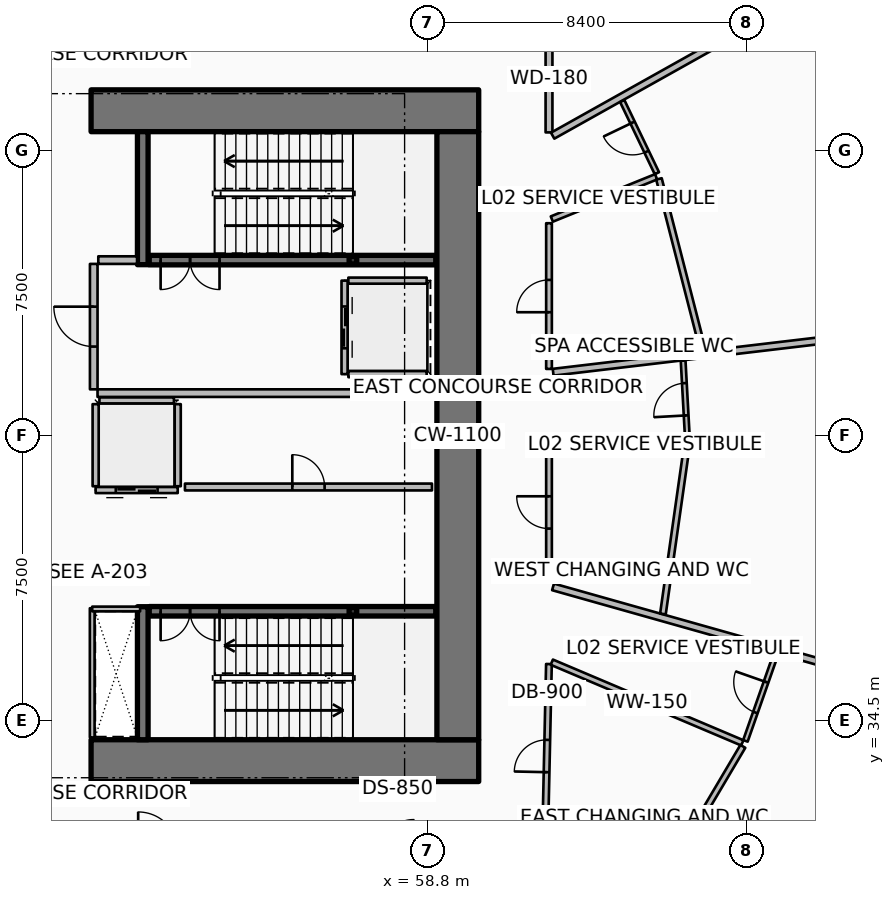
"""IFC4 building model, lengths in metres.
Left out: names, types, materials, properties, quantities, classifications, styles, units other than length and angle.
Written with IfcOpenShell. Run it as: python <this file> out.ifc"""

import sys

from ifc_helpers import new_model, si_unit, direction, frame, frame_2d, origin, origin_2d, place, context, subcontext, project, spatial, rectangle, hollow_rectangle, extrude, element, fill, save


model = new_model("IFC4")
c1 = context("Model", 3, precision=1e-05, world=origin(), true_north=direction((0.0, 1.0)))
c2 = subcontext(c1, "Body", "Model", "MODEL_VIEW")
j1 = project(units=[si_unit("LENGTHUNIT", "METRE"), si_unit("PLANEANGLEUNIT", "RADIAN")], contexts=[c1])
p1 = place(None, origin())
s1 = spatial("IfcSite", under=j1, at=p1, CompositionType="ELEMENT")
p2 = place(p1, origin())
s2 = spatial("IfcBuilding", under=s1, at=p2, CompositionType="ELEMENT")
p3 = place(p2, frame((0.0, 0.0, 12.0)))
s3 = spatial("IfcBuildingStorey", under=s2, at=p3, CompositionType="ELEMENT", Elevation=12.0)
for number, where, z_axis, x_axis in (
    (1, (49.95, 33.45, 0.0), (0.0, 0.0, 1.0), (1.0, 0.0, 0.0)),
    (2, (49.95, 50.55, 0.0), (0.0, 0.0, 1.0), (1.0, 0.0, 0.0)),
):
    element("IfcWall", number, at=place(p3, frame(where, z_axis=z_axis, x_axis=x_axis)), inside=s3, PredefinedType="SHEAR", context=c2, shape_type="SweptSolid", body=[
        extrude(rectangle(XDim=10.2, YDim=1.1, at=frame_2d((5.1, 0.0))), origin(), (0.0, 0.0, 1.0), 4.8),
    ])
p4 = place(p3, frame((59.6, 34.0, 0.0), z_axis=(0.0, 0.0, 1.0), x_axis=(0.0, 1.0, 0.0)))
e3 = element("IfcWall", 3, at=p4, inside=s3, PredefinedType="SHEAR", context=c2, shape_type="SweptSolid", body=[
    extrude(rectangle(XDim=16.0, YDim=1.1, at=frame_2d((8.0, 0.0))), origin(), (0.0, 0.0, 1.0), 4.8),
])
for number, where, z_axis, x_axis in (
    (4, (51.31, 46.5, 0.0), (0.0, 0.0, 1.0), (0.0, 1.0, 0.0)),
    (5, (51.31, 34.0, 0.0), (0.0, 0.0, 1.0), (0.0, 1.0, 0.0)),
):
    element("IfcWall", number, at=place(p3, frame(where, z_axis=z_axis, x_axis=x_axis)), inside=s3, PredefinedType="SHEAR", context=c2, shape_type="SweptSolid", body=[
        extrude(rectangle(XDim=3.5, YDim=0.28, at=frame_2d((1.75, 0.0))), origin(), (0.0, 0.0, 1.0), 4.8),
    ])
for number, where, z_axis, x_axis in (
    (6, (56.84, 46.62, 0.0), (0.0, 0.0, 1.0), (1.0, 0.0, 0.0)),
    (7, (56.84, 37.38, 0.0), (0.0, 0.0, 1.0), (1.0, 0.0, 0.0)),
):
    element("IfcColumn", number, at=place(p3, frame(where, z_axis=z_axis, x_axis=x_axis)), inside=s3, PredefinedType="COLUMN", context=c2, shape_type="SweptSolid", body=[
        extrude(hollow_rectangle(XDim=0.2, YDim=0.2, WallThickness=0.01, InnerFilletRadius=0.01, OuterFilletRadius=0.02, at=origin_2d()), origin(), (0.0, 0.0, 1.0), 2.195),
    ])
p5 = place(p3, frame((51.48, 46.62, 0.0), z_axis=(0.0, 0.0, 1.0), x_axis=(1.0, 0.0, 0.0)))
e8 = element("IfcWall", 8, at=p5, inside=s3, PredefinedType="SOLIDWALL", context=c2, shape_type="SweptSolid", body=[
    extrude(rectangle(XDim=7.54, YDim=0.25, at=frame_2d((3.77, 0.0))), origin(), (0.0, 0.0, 1.0), 4.48),
])
p6 = place(p5, frame((0.3, 0.0, 0.0)))
e9 = element("IfcOpeningElement", 9, at=p6, cuts=e8, PredefinedType="OPENING", context=c2, shape_type="SweptSolid", body=[
    extrude(rectangle(XDim=1.55, YDim=2.15, at=frame_2d((0.775, 1.075))), frame((0.0, 0.135, 0.0), z_axis=(0.0, -1.0, 0.0), x_axis=(1.0, 0.0, 0.0)), (0.0, 0.0, 1.0), 0.27),
])
p7 = place(p3, frame((51.48, 37.38, 0.0), z_axis=(0.0, 0.0, 1.0), x_axis=(1.0, 0.0, 0.0)))
e10 = element("IfcWall", 10, at=p7, inside=s3, PredefinedType="SOLIDWALL", context=c2, shape_type="SweptSolid", body=[
    extrude(rectangle(XDim=7.54, YDim=0.25, at=frame_2d((3.77, 0.0))), origin(), (0.0, 0.0, 1.0), 4.48),
])
p8 = place(p7, frame((0.3, 0.0, 0.0)))
e11 = element("IfcOpeningElement", 11, at=p8, cuts=e10, PredefinedType="OPENING", context=c2, shape_type="SweptSolid", body=[
    extrude(rectangle(XDim=1.55, YDim=2.15, at=frame_2d((0.775, 1.075))), frame((0.0, 0.135, 0.0), z_axis=(0.0, -1.0, 0.0), x_axis=(1.0, 0.0, 0.0)), (0.0, 0.0, 1.0), 0.27),
])
p9 = place(p3, frame((56.62, 46.08, 0.0), z_axis=(0.0, 0.0, 1.0), x_axis=(0.0, -1.0, 0.0)))
e12 = element("IfcWall", 12, at=p9, inside=s3, PredefinedType="PARTITIONING", context=c2, shape_type="SweptSolid", body=[
    extrude(rectangle(XDim=2.46, YDim=0.16, at=frame_2d((1.23, 0.0))), origin(), (0.0, 0.0, 1.0), 4.48),
])
p10 = place(p9, frame((0.68, 0.0, 0.0)))
e13 = element("IfcOpeningElement", 13, at=p10, cuts=e12, PredefinedType="OPENING", context=c2, shape_type="SweptSolid", body=[
    extrude(rectangle(XDim=1.1, YDim=2.1, at=frame_2d((0.55, 1.05))), frame((0.0, 0.09, 0.0), z_axis=(0.0, -1.0, 0.0), x_axis=(1.0, 0.0, 0.0)), (0.0, 0.0, 1.0), 0.18),
])
for number, where, z_axis, x_axis in (
    (14, (56.72, 46.08, 0.0), (0.0, 0.0, 1.0), (1.0, 0.0, 0.0)),
    (15, (56.72, 43.62, 0.0), (0.0, 0.0, 1.0), (1.0, 0.0, 0.0)),
):
    element("IfcWall", number, at=place(p3, frame(where, z_axis=z_axis, x_axis=x_axis)), inside=s3, PredefinedType="PARTITIONING", context=c2, shape_type="SweptSolid", body=[
        extrude(rectangle(XDim=2.06, YDim=0.16, at=frame_2d((1.03, 0.0))), origin(), (0.0, 0.0, 1.0), 4.48),
    ])
p11 = place(p3, frame((52.23, 40.57, 0.0), z_axis=(0.0, 0.0, 1.0), x_axis=(-1.0, 0.0, 0.0)))
e16 = element("IfcWall", 16, at=p11, inside=s3, PredefinedType="PARTITIONING", context=c2, shape_type="SweptSolid", body=[
    extrude(rectangle(XDim=2.16, YDim=0.16, at=frame_2d((1.08, 0.0))), origin(), (0.0, 0.0, 1.0), 4.48),
])
p12 = place(p11, frame((0.53, 0.0, 0.0)))
e17 = element("IfcOpeningElement", 17, at=p12, cuts=e16, PredefinedType="OPENING", context=c2, shape_type="SweptSolid", body=[
    extrude(rectangle(XDim=1.1, YDim=2.1, at=frame_2d((0.55, 1.05))), frame((0.0, 0.09, 0.0), z_axis=(0.0, -1.0, 0.0), x_axis=(1.0, 0.0, 0.0)), (0.0, 0.0, 1.0), 0.18),
])
for number, where, z_axis, x_axis in (
    (18, (52.23, 40.67, 0.0), (0.0, 0.0, 1.0), (0.0, 1.0, 0.0)),
    (19, (50.07, 40.67, 0.0), (0.0, 0.0, 1.0), (0.0, 1.0, 0.0)),
):
    element("IfcWall", number, at=place(p3, frame(where, z_axis=z_axis, x_axis=x_axis)), inside=s3, PredefinedType="PARTITIONING", context=c2, shape_type="SweptSolid", body=[
        extrude(rectangle(XDim=2.16, YDim=0.16, at=frame_2d((1.08, 0.0))), origin(), (0.0, 0.0, 1.0), 4.48),
    ])
p13 = place(p3, frame((50.17, 42.93, 0.0), z_axis=(0.0, 0.0, 1.0), x_axis=(1.0, 0.0, 0.0)))
e20 = element("IfcWall", 20, at=p13, inside=s3, PredefinedType="PARTITIONING", context=c2, shape_type="SweptSolid", body=[
    extrude(rectangle(XDim=1.96, YDim=0.16, at=frame_2d((0.98, 0.0))), origin(), (0.0, 0.0, 1.0), 4.48),
])
p14 = place(p3, frame((52.42, 40.65, 0.0), z_axis=(0.0, 0.0, 1.0), x_axis=(1.0, 0.0, 0.0)))
e21 = element("IfcWall", 21, at=p14, inside=s3, PredefinedType="PARTITIONING", context=c2, shape_type="SweptSolid", body=[
    extrude(rectangle(XDim=6.5, YDim=0.18, at=frame_2d((3.25, 0.0))), origin(), (0.0, 0.0, 1.0), 4.48),
])
p15 = place(p14, frame((2.825, 0.0, 0.0)))
e22 = element("IfcOpeningElement", 22, at=p15, cuts=e21, PredefinedType="OPENING", context=c2, shape_type="SweptSolid", body=[
    extrude(rectangle(XDim=0.85, YDim=2.06, at=frame_2d((0.425, 1.03))), frame((0.0, 0.1, 0.0), z_axis=(0.0, -1.0, 0.0), x_axis=(1.0, 0.0, 0.0)), (0.0, 0.0, 1.0), 0.2),
])
p16 = place(p3, frame((50.12, 43.12, 0.0), z_axis=(0.0, 0.0, 1.0), x_axis=(1.0, 0.0, 0.0)))
e23 = element("IfcWall", 23, at=p16, inside=s3, PredefinedType="PARTITIONING", context=c2, shape_type="SweptSolid", body=[
    extrude(rectangle(XDim=8.88, YDim=0.2, at=frame_2d((4.44, 0.0))), origin(), (0.0, 0.0, 1.0), 4.48),
])
p17 = place(p3, frame((50.14, 46.62, 0.0), z_axis=(0.0, 0.0, 1.0), x_axis=(1.0, 0.0, 0.0)))
e24 = element("IfcWall", 24, at=p17, inside=s3, PredefinedType="PARTITIONING", context=c2, shape_type="SweptSolid", body=[
    extrude(rectangle(XDim=1.02, YDim=0.2, at=frame_2d((0.51, 0.0))), origin(), (0.0, 0.0, 1.0), 4.48),
])
p18 = place(p3, frame((50.02, 43.22, 0.0), z_axis=(0.0, 0.0, 1.0), x_axis=(0.0, 1.0, 0.0)))
e25 = element("IfcWall", 25, at=p18, inside=s3, PredefinedType="PARTITIONING", context=c2, shape_type="SweptSolid", body=[
    extrude(rectangle(XDim=3.3, YDim=0.2, at=frame_2d((1.65, 0.0))), origin(), (0.0, 0.0, 1.0), 4.48),
])
p19 = place(p18, frame((1.125, 0.0, 0.0)))
e26 = element("IfcOpeningElement", 26, at=p19, cuts=e25, PredefinedType="OPENING", context=c2, shape_type="SweptSolid", body=[
    extrude(rectangle(XDim=1.05, YDim=2.1, at=frame_2d((0.525, 1.05))), frame((0.0, 0.11, 0.0), z_axis=(0.0, -1.0, 0.0), x_axis=(1.0, 0.0, 0.0)), (0.0, 0.0, 1.0), 0.22),
])
p20 = place(p3, frame((49.98, 34.06, 0.0), z_axis=(0.0, 0.0, 1.0), x_axis=(0.0, 1.0, 0.0)))
e27 = element("IfcWall", 27, at=p20, inside=s3, PredefinedType="PARTITIONING", context=c2, shape_type="SweptSolid", body=[
    extrude(rectangle(XDim=3.4, YDim=0.125, at=frame_2d((1.7, 0.0))), origin(), (0.0, 0.0, 1.0), 3.92),
])
p21 = place(p3, frame((49.98, 37.44, 0.0), z_axis=(0.0, 0.0, 1.0), x_axis=(1.0, 0.0, 0.0)))
e28 = element("IfcWall", 28, at=p21, inside=s3, PredefinedType="PARTITIONING", context=c2, shape_type="SweptSolid", body=[
    extrude(rectangle(XDim=1.26, YDim=0.125, at=frame_2d((0.63, 0.0))), origin(), (0.0, 0.0, 1.0), 3.92),
])
p22 = place(p3, frame((62.0, 49.98, 0.0), z_axis=(0.0, 0.0, 1.0), x_axis=(0.0, 1.0, 0.0)))
e29 = element("IfcWall", 29, at=p22, inside=s3, PredefinedType="PARTITIONING", context=c2, shape_type="SweptSolid", body=[
    extrude(rectangle(XDim=2.83, YDim=0.18, at=frame_2d((1.415, 0.0))), origin(), (0.0, 0.0, 1.0), 3.693),
])
p23 = place(p3, frame((62.096, 49.894, 0.0), z_axis=(0.0, 0.0, 1.0), x_axis=(0.872490608205, 0.488630881744, 0.0)))
e30 = element("IfcWall", 30, at=p23, inside=s3, PredefinedType="PARTITIONING", context=c2, shape_type="SweptSolid", body=[
    extrude(rectangle(XDim=19.185, YDim=0.18, at=frame_2d((9.592, 0.0))), origin(), (0.0, 0.0, 1.0), 3.693),
])
p24 = place(p3, frame((61.892, 31.15, 0.0), z_axis=(0.0, 0.0, 1.0), x_axis=(0.021928973177, 0.999759531155, 0.0)))
e31 = element("IfcWall", 31, at=p24, inside=s3, PredefinedType="PARTITIONING", context=c2, shape_type="SweptSolid", body=[
    extrude(rectangle(XDim=4.843, YDim=0.15, at=frame_2d((2.421, 0.0))), origin(), (0.0, 0.0, 1.0), 3.693),
])
p25 = place(p24, frame((1.997, 0.0, 0.0)))
e32 = element("IfcOpeningElement", 32, at=p25, cuts=e31, PredefinedType="OPENING", context=c2, shape_type="SweptSolid", body=[
    extrude(rectangle(XDim=0.85, YDim=2.06, at=frame_2d((0.425, 1.03))), frame((0.0, 0.085, 0.0), z_axis=(0.0, -1.0, 0.0), x_axis=(1.0, 0.0, 0.0)), (0.0, 0.0, 1.0), 0.17),
])
p26 = place(p3, frame((62.074, 36.041, 0.0), z_axis=(0.0, 0.0, 1.0), x_axis=(0.920841540816, -0.38993699069, 0.0)))
e33 = element("IfcWall", 33, at=p26, inside=s3, PredefinedType="PARTITIONING", context=c2, shape_type="SweptSolid", body=[
    extrude(rectangle(XDim=5.443, YDim=0.15, at=frame_2d((2.722, 0.0))), origin(), (0.0, 0.0, 1.0), 3.92),
])
p27 = place(p3, frame((64.375, 29.217, 0.0), z_axis=(0.0, 0.0, 1.0), x_axis=(0.509047270842, 0.860738564286, 0.0)))
e34 = element("IfcWall", 34, at=p27, inside=s3, PredefinedType="PARTITIONING", context=c2, shape_type="SweptSolid", body=[
    extrude(rectangle(XDim=5.354, YDim=0.15, at=frame_2d((2.677, 0.0))), origin(), (0.0, 0.0, 1.0), 3.693),
])
p28 = place(p3, frame((67.168, 33.97, 0.0), z_axis=(0.0, 0.0, 1.0), x_axis=(0.331316814656, 0.943519564358, 0.0)))
e35 = element("IfcWall", 35, at=p28, inside=s3, PredefinedType="PARTITIONING", context=c2, shape_type="SweptSolid", body=[
    extrude(rectangle(XDim=2.43, YDim=0.125, at=frame_2d((1.215, 0.0))), origin(), (0.0, 0.0, 1.0), 3.693),
])
p29 = place(p28, frame((0.79, 0.0, 0.0)))
e36 = element("IfcOpeningElement", 36, at=p29, cuts=e35, PredefinedType="OPENING", context=c2, shape_type="SweptSolid", body=[
    extrude(rectangle(XDim=0.85, YDim=2.06, at=frame_2d((0.425, 1.03))), frame((0.0, 0.073, 0.0), z_axis=(0.0, -1.0, 0.0), x_axis=(1.0, 0.0, 0.0)), (0.0, 0.0, 1.0), 0.145),
])
p30 = place(p3, frame((62.106, 38.022, 0.0), z_axis=(0.0, 0.0, 1.0), x_axis=(0.962455233657, -0.271440459782, 0.0)))
e37 = element("IfcWall", 37, at=p30, inside=s3, PredefinedType="PARTITIONING", context=c2, shape_type="SweptSolid", body=[
    extrude(rectangle(XDim=19.716, YDim=0.18, at=frame_2d((9.858, 0.0))), origin(), (0.0, 0.0, 1.0), 3.693),
])
p31 = place(p3, frame((62.0, 38.152, 0.0), z_axis=(0.0, 0.0, 1.0), x_axis=(0.0, 1.0, 0.0)))
e38 = element("IfcWall", 38, at=p31, inside=s3, PredefinedType="PARTITIONING", context=c2, shape_type="SweptSolid", body=[
    extrude(rectangle(XDim=3.658, YDim=0.15, at=frame_2d((1.829, 0.0))), origin(), (0.0, 0.0, 1.0), 3.693),
])
p32 = place(p31, frame((1.404, 0.0, 0.0)))
e39 = element("IfcOpeningElement", 39, at=p32, cuts=e38, PredefinedType="OPENING", context=c2, shape_type="SweptSolid", body=[
    extrude(rectangle(XDim=0.85, YDim=2.06, at=frame_2d((0.425, 1.03))), frame((0.0, 0.085, 0.0), z_axis=(0.0, -1.0, 0.0), x_axis=(1.0, 0.0, 0.0)), (0.0, 0.0, 1.0), 0.17),
])
p33 = place(p3, frame((62.08, 41.889, 0.0), z_axis=(0.0, 0.0, 1.0), x_axis=(0.999969031596, -0.007869933178, 0.0)))
e40 = element("IfcWall", 40, at=p33, inside=s3, PredefinedType="PARTITIONING", context=c2, shape_type="SweptSolid", body=[
    extrude(rectangle(XDim=3.505, YDim=0.15, at=frame_2d((1.753, 0.0))), origin(), (0.0, 0.0, 1.0), 3.92),
])
p34 = place(p3, frame((64.998, 37.309, 0.0), z_axis=(0.0, 0.0, 1.0), x_axis=(0.140922059176, 0.990020693338, 0.0)))
e41 = element("IfcWall", 41, at=p34, inside=s3, PredefinedType="PARTITIONING", context=c2, shape_type="SweptSolid", body=[
    extrude(rectangle(XDim=4.518, YDim=0.15, at=frame_2d((2.259, 0.0))), origin(), (0.0, 0.0, 1.0), 3.693),
])
p35 = place(p3, frame((65.641, 41.941, 0.0), z_axis=(0.0, 0.0, 1.0), x_axis=(-0.054918793983, 0.998490824228, 0.0)))
e42 = element("IfcWall", 42, at=p35, inside=s3, PredefinedType="PARTITIONING", context=c2, shape_type="SweptSolid", body=[
    extrude(rectangle(XDim=2.036, YDim=0.125, at=frame_2d((1.018, 0.0))), origin(), (0.0, 0.0, 1.0), 3.693),
])
p36 = place(p35, frame((0.593, 0.0, 0.0)))
e43 = element("IfcOpeningElement", 43, at=p36, cuts=e42, PredefinedType="OPENING", context=c2, shape_type="SweptSolid", body=[
    extrude(rectangle(XDim=0.85, YDim=2.06, at=frame_2d((0.425, 1.03))), frame((0.0, 0.073, 0.0), z_axis=(0.0, -1.0, 0.0), x_axis=(1.0, 0.0, 0.0)), (0.0, 0.0, 1.0), 0.145),
])
p37 = place(p3, frame((62.109, 43.67, 0.0), z_axis=(0.0, 0.0, 1.0), x_axis=(0.993068665713, 0.117535633659, 0.0)))
e44 = element("IfcWall", 44, at=p37, inside=s3, PredefinedType="PARTITIONING", context=c2, shape_type="SweptSolid", body=[
    extrude(rectangle(XDim=21.133, YDim=0.18, at=frame_2d((10.566, 0.0))), origin(), (0.0, 0.0, 1.0), 3.693),
])
p38 = place(p3, frame((62.0, 43.757, 0.0), z_axis=(0.0, 0.0, 1.0), x_axis=(0.0, 1.0, 0.0)))
e45 = element("IfcWall", 45, at=p38, inside=s3, PredefinedType="PARTITIONING", context=c2, shape_type="SweptSolid", body=[
    extrude(rectangle(XDim=3.833, YDim=0.15, at=frame_2d((1.917, 0.0))), origin(), (0.0, 0.0, 1.0), 3.693),
])
p39 = place(p38, frame((1.492, 0.0, 0.0)))
e46 = element("IfcOpeningElement", 46, at=p39, cuts=e45, PredefinedType="OPENING", context=c2, shape_type="SweptSolid", body=[
    extrude(rectangle(XDim=0.85, YDim=2.06, at=frame_2d((0.425, 1.03))), frame((0.0, 0.085, 0.0), z_axis=(0.0, -1.0, 0.0), x_axis=(1.0, 0.0, 0.0)), (0.0, 0.0, 1.0), 0.17),
])
p40 = place(p3, frame((62.074, 47.701, 0.0), z_axis=(0.0, 0.0, 1.0), x_axis=(0.926852538468, 0.375425587747, 0.0)))
e47 = element("IfcWall", 47, at=p40, inside=s3, PredefinedType="PARTITIONING", context=c2, shape_type="SweptSolid", body=[
    extrude(rectangle(XDim=2.96, YDim=0.15, at=frame_2d((1.48, 0.0))), origin(), (0.0, 0.0, 1.0), 3.92),
])
p41 = place(p3, frame((66.054, 44.237, 0.0), z_axis=(0.0, 0.0, 1.0), x_axis=(-0.248710144761, 0.968577959636, 0.0)))
e48 = element("IfcWall", 48, at=p41, inside=s3, PredefinedType="PARTITIONING", context=c2, shape_type="SweptSolid", body=[
    extrude(rectangle(XDim=4.667, YDim=0.15, at=frame_2d((2.333, 0.0))), origin(), (0.0, 0.0, 1.0), 3.693),
])
p42 = place(p3, frame((64.839, 48.906, 0.0), z_axis=(0.0, 0.0, 1.0), x_axis=(-0.432923235959, 0.901430791446, 0.0)))
e49 = element("IfcWall", 49, at=p42, inside=s3, PredefinedType="PARTITIONING", context=c2, shape_type="SweptSolid", body=[
    extrude(rectangle(XDim=2.106, YDim=0.125, at=frame_2d((1.053, 0.0))), origin(), (0.0, 0.0, 1.0), 3.693),
])
p43 = place(p42, frame((0.628, 0.0, 0.0)))
e50 = element("IfcOpeningElement", 50, at=p43, cuts=e49, PredefinedType="OPENING", context=c2, shape_type="SweptSolid", body=[
    extrude(rectangle(XDim=0.85, YDim=2.06, at=frame_2d((0.425, 1.03))), frame((0.0, 0.073, 0.0), z_axis=(0.0, -1.0, 0.0), x_axis=(1.0, 0.0, 0.0)), (0.0, 0.0, 1.0), 0.145),
])
p44 = place(p6, origin())
e51 = element("IfcDoor", 51, at=p44, inside=s3, OperationType="DOUBLE_DOOR_SINGLE_SWING", PredefinedType="DOOR", context=c2, shape_type="SweptSolid", body=[
    extrude(rectangle(XDim=1.55, YDim=2.15, at=frame_2d((0.775, 1.075))), frame((0.0, 0.025, 0.0), z_axis=(0.0, -1.0, 0.0), x_axis=(1.0, 0.0, 0.0)), (0.0, 0.0, 1.0), 0.05),
])
fill(e9, e51)
p45 = place(p8, origin())
e52 = element("IfcDoor", 52, at=p45, inside=s3, OperationType="DOUBLE_DOOR_SINGLE_SWING", PredefinedType="DOOR", context=c2, shape_type="SweptSolid", body=[
    extrude(rectangle(XDim=1.55, YDim=2.15, at=frame_2d((0.775, 1.075))), frame((0.0, 0.025, 0.0), z_axis=(0.0, -1.0, 0.0), x_axis=(1.0, 0.0, 0.0)), (0.0, 0.0, 1.0), 0.05),
])
fill(e11, e52)
p46 = place(p10, origin())
e53 = element("IfcDoor", 53, at=p46, inside=s3, OperationType="DOUBLE_DOOR_SLIDING", PredefinedType="DOOR", context=c2, shape_type="SweptSolid", body=[
    extrude(rectangle(XDim=1.1, YDim=2.1, at=frame_2d((0.55, 1.05))), frame((0.0, 0.025, 0.0), z_axis=(0.0, -1.0, 0.0), x_axis=(1.0, 0.0, 0.0)), (0.0, 0.0, 1.0), 0.05),
])
fill(e13, e53)
p47 = place(p12, origin())
e54 = element("IfcDoor", 54, at=p47, inside=s3, OperationType="DOUBLE_DOOR_SLIDING", PredefinedType="DOOR", context=c2, shape_type="SweptSolid", body=[
    extrude(rectangle(XDim=1.1, YDim=2.1, at=frame_2d((0.55, 1.05))), frame((0.0, 0.025, 0.0), z_axis=(0.0, -1.0, 0.0), x_axis=(1.0, 0.0, 0.0)), (0.0, 0.0, 1.0), 0.05),
])
fill(e17, e54)
p48 = place(p15, origin())
e55 = element("IfcDoor", 55, at=p48, inside=s3, OperationType="SINGLE_SWING_LEFT", PredefinedType="DOOR", context=c2, shape_type="SweptSolid", body=[
    extrude(rectangle(XDim=0.85, YDim=2.06, at=frame_2d((0.425, 1.03))), frame((0.0, 0.025, 0.0), z_axis=(0.0, -1.0, 0.0), x_axis=(1.0, 0.0, 0.0)), (0.0, 0.0, 1.0), 0.05),
])
fill(e22, e55)
p49 = place(p19, origin())
e56 = element("IfcDoor", 56, at=p49, inside=s3, OperationType="SINGLE_SWING_RIGHT", PredefinedType="DOOR", context=c2, shape_type="SweptSolid", body=[
    extrude(rectangle(XDim=1.05, YDim=2.1, at=frame_2d((0.525, 1.05))), frame((0.0, 0.025, 0.0), z_axis=(0.0, -1.0, 0.0), x_axis=(1.0, 0.0, 0.0)), (0.0, 0.0, 1.0), 0.05),
])
fill(e26, e56)
p50 = place(p25, origin())
e57 = element("IfcDoor", 57, at=p50, inside=s3, OperationType="SINGLE_SWING_LEFT", PredefinedType="DOOR", context=c2, shape_type="SweptSolid", body=[
    extrude(rectangle(XDim=0.85, YDim=2.06, at=frame_2d((0.425, 1.03))), frame((0.0, 0.025, 0.0), z_axis=(0.0, -1.0, 0.0), x_axis=(1.0, 0.0, 0.0)), (0.0, 0.0, 1.0), 0.05),
])
fill(e32, e57)
p51 = place(p29, origin())
e58 = element("IfcDoor", 58, at=p51, inside=s3, OperationType="SINGLE_SWING_RIGHT", PredefinedType="DOOR", context=c2, shape_type="SweptSolid", body=[
    extrude(rectangle(XDim=0.85, YDim=2.06, at=frame_2d((0.425, 1.03))), frame((0.0, 0.025, 0.0), z_axis=(0.0, -1.0, 0.0), x_axis=(1.0, 0.0, 0.0)), (0.0, 0.0, 1.0), 0.05),
])
fill(e36, e58)
p52 = place(p32, origin())
e59 = element("IfcDoor", 59, at=p52, inside=s3, OperationType="SINGLE_SWING_RIGHT", PredefinedType="DOOR", context=c2, shape_type="SweptSolid", body=[
    extrude(rectangle(XDim=0.85, YDim=2.06, at=frame_2d((0.425, 1.03))), frame((0.0, 0.025, 0.0), z_axis=(0.0, -1.0, 0.0), x_axis=(1.0, 0.0, 0.0)), (0.0, 0.0, 1.0), 0.05),
])
fill(e39, e59)
p53 = place(p36, origin())
e60 = element("IfcDoor", 60, at=p53, inside=s3, OperationType="SINGLE_SWING_LEFT", PredefinedType="DOOR", context=c2, shape_type="SweptSolid", body=[
    extrude(rectangle(XDim=0.85, YDim=2.06, at=frame_2d((0.425, 1.03))), frame((0.0, 0.025, 0.0), z_axis=(0.0, -1.0, 0.0), x_axis=(1.0, 0.0, 0.0)), (0.0, 0.0, 1.0), 0.05),
])
fill(e43, e60)
p54 = place(p39, origin())
e61 = element("IfcDoor", 61, at=p54, inside=s3, OperationType="SINGLE_SWING_LEFT", PredefinedType="DOOR", context=c2, shape_type="SweptSolid", body=[
    extrude(rectangle(XDim=0.85, YDim=2.06, at=frame_2d((0.425, 1.03))), frame((0.0, 0.025, 0.0), z_axis=(0.0, -1.0, 0.0), x_axis=(1.0, 0.0, 0.0)), (0.0, 0.0, 1.0), 0.05),
])
fill(e46, e61)
p55 = place(p43, origin())
e62 = element("IfcDoor", 62, at=p55, inside=s3, OperationType="SINGLE_SWING_RIGHT", PredefinedType="DOOR", context=c2, shape_type="SweptSolid", body=[
    extrude(rectangle(XDim=0.85, YDim=2.06, at=frame_2d((0.425, 1.03))), frame((0.0, 0.025, 0.0), z_axis=(0.0, -1.0, 0.0), x_axis=(1.0, 0.0, 0.0)), (0.0, 0.0, 1.0), 0.05),
])
fill(e50, e62)
save(model, sys.argv[1])
